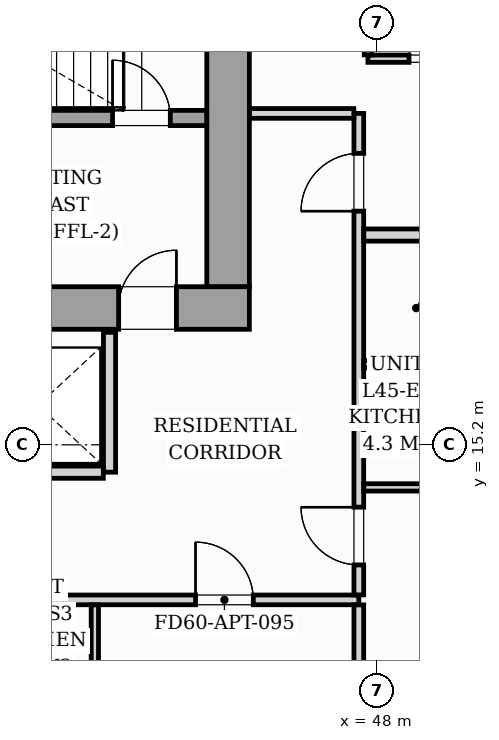
"""IFC4 building model, lengths in metres.
Left out: names, types, materials, properties, quantities, classifications, styles, units other than length and angle.
Written with IfcOpenShell. Run it as: python <this file> out.ifc"""

import sys

from ifc_helpers import new_model, si_unit, direction, frame, frame_2d, origin, origin_2d, place, context, subcontext, project, spatial, rectangle, i_section, extrude, source, transform, mapped, element, fill, save


model = new_model("IFC4")
c1 = context("Model", 3, precision=1e-05, world=origin(), true_north=direction((0.0, 1.0)))
c2 = subcontext(c1, "Body", "Model", "MODEL_VIEW")
j1 = project(units=[si_unit("LENGTHUNIT", "METRE"), si_unit("PLANEANGLEUNIT", "RADIAN")], contexts=[c1])
p1 = place(None, origin())
s1 = spatial("IfcSite", under=j1, at=p1, CompositionType="ELEMENT")
p2 = place(p1, origin())
s2 = spatial("IfcBuilding", under=s1, at=p2, CompositionType="ELEMENT")
p3 = place(p2, frame((0.0, 0.0, 156.6)))
s3 = spatial("IfcBuildingStorey", under=s2, at=p3, CompositionType="ELEMENT", Elevation=156.6)
m1 = source(origin(), c2, "Body", "SweptSolid", [
    extrude(i_section(OverallWidth=0.421, OverallDepth=0.465, WebThickness=0.045, FlangeThickness=0.073, FilletRadius=0.018, at=origin_2d()), origin(), (0.0, 0.0, 1.0), 3.196),
])
p4 = place(p3, frame((45.6, 17.4, 0.002), z_axis=(0.0, 0.0, 1.0), x_axis=(1.0, 0.0, 0.0)))
e1 = element("IfcColumn", 1, at=p4, inside=s3, PredefinedType="PILASTER", context=c2, shape_type="MappedRepresentation", body=[
    mapped(m1, transform((0.0, 0.0, 0.0), scale=1.0)),
])
p5 = place(p3, frame((26.1, 17.45, 0.0), z_axis=(0.0, 0.0, 1.0), x_axis=(1.0, 0.0, 0.0)))
e2 = element("IfcWall", 2, at=p5, inside=s3, PredefinedType="SHEAR", context=c2, shape_type="SweptSolid", body=[
    extrude(rectangle(XDim=19.8, YDim=0.7, at=frame_2d((9.9, 0.0))), origin(), (0.0, 0.0, 1.0), 3.2),
])
p6 = place(p5, frame((1.05, 0.0, 0.0)))
e3 = element("IfcOpeningElement", 3, at=p6, cuts=e2, PredefinedType="OPENING", context=c2, shape_type="SweptSolid", body=[
    extrude(rectangle(XDim=0.95, YDim=2.06, at=frame_2d((0.475, 1.03))), frame((0.0, 0.36, 0.0), z_axis=(0.0, -1.0, 0.0), x_axis=(1.0, 0.0, 0.0)), (0.0, 0.0, 1.0), 0.72),
])
p7 = place(p5, frame((9.48, 0.0, 0.0)))
e4 = element("IfcOpeningElement", 4, at=p7, cuts=e2, PredefinedType="OPENING", context=c2, shape_type="SweptSolid", body=[
    extrude(rectangle(XDim=0.85, YDim=2.0, at=frame_2d((0.425, 1.0))), frame((0.0, 0.36, 0.0), z_axis=(0.0, -1.0, 0.0), x_axis=(1.0, 0.0, 0.0)), (0.0, 0.0, 1.0), 0.72),
])
p8 = place(p5, frame((17.65, 0.0, 0.0)))
e5 = element("IfcOpeningElement", 5, at=p8, cuts=e2, PredefinedType="OPENING", context=c2, shape_type="SweptSolid", body=[
    extrude(rectangle(XDim=0.95, YDim=2.06, at=frame_2d((0.475, 1.03))), frame((0.0, 0.36, 0.0), z_axis=(0.0, -1.0, 0.0), x_axis=(1.0, 0.0, 0.0)), (0.0, 0.0, 1.0), 0.72),
])
p9 = place(p3, frame((45.55, 17.802, 0.0), z_axis=(0.0, 0.0, 1.0), x_axis=(0.0, 1.0, 0.0)))
e6 = element("IfcWall", 6, at=p9, inside=s3, PredefinedType="SHEAR", context=c2, shape_type="SweptSolid", body=[
    extrude(rectangle(XDim=5.796, YDim=0.7, at=frame_2d((2.898, 0.0))), origin(), (0.0, 0.0, 1.0), 3.2),
])
p10 = place(p3, frame((37.05, 20.575, 0.0), z_axis=(0.0, 0.0, 1.0), x_axis=(1.0, 0.0, 0.0)))
e7 = element("IfcWall", 7, at=p10, inside=s3, PredefinedType="SOLIDWALL", context=c2, shape_type="SweptSolid", body=[
    extrude(rectangle(XDim=8.148, YDim=0.25, at=frame_2d((4.074, 0.0))), origin(), (0.0, 0.0, 1.0), 3.2),
])
p11 = place(p10, frame((6.6, 0.0, 0.0)))
e8 = element("IfcOpeningElement", 8, at=p11, cuts=e7, PredefinedType="OPENING", context=c2, shape_type="SweptSolid", body=[
    extrude(rectangle(XDim=0.95, YDim=2.06, at=frame_2d((0.475, 1.03))), frame((0.0, 0.135, 0.0), z_axis=(0.0, -1.0, 0.0), x_axis=(1.0, 0.0, 0.0)), (0.0, 0.0, 1.0), 0.27),
])
p12 = place(p3, frame((43.6, 14.75, 0.0), z_axis=(0.0, 0.0, 1.0), x_axis=(0.0, 1.0, 0.0)))
e9 = element("IfcWall", 9, at=p12, inside=s3, PredefinedType="PARTITIONING", context=c2, shape_type="SweptSolid", body=[
    extrude(rectangle(XDim=2.3, YDim=0.2, at=frame_2d((1.15, 0.0))), origin(), (0.0, 0.0, 1.0), 2.94),
])
p13 = place(p3, frame((41.352, 14.75, 0.0), z_axis=(0.0, 0.0, 1.0), x_axis=(1.0, 0.0, 0.0)))
e10 = element("IfcWall", 10, at=p13, inside=s3, PredefinedType="PARTITIONING", context=c2, shape_type="SweptSolid", body=[
    extrude(rectangle(XDim=2.146, YDim=0.2, at=frame_2d((1.073, 0.0))), origin(), (0.0, 0.0, 1.0), 2.94),
])
p14 = place(p3, frame((22.05, 12.65, 0.0), z_axis=(0.0, 0.0, 1.0), x_axis=(1.0, 0.0, 0.0)))
e11 = element("IfcWall", 11, at=p14, inside=s3, PredefinedType="PARTITIONING", context=c2, shape_type="SweptSolid", body=[
    extrude(rectangle(XDim=25.65, YDim=0.16, at=frame_2d((12.825, 0.0))), origin(), (0.0, 0.0, 1.0), 2.94),
])
p15 = place(p14, frame((1.736, 0.0, 0.0)))
e12 = element("IfcOpeningElement", 12, at=p15, cuts=e11, PredefinedType="OPENING", context=c2, shape_type="SweptSolid", body=[
    extrude(rectangle(XDim=0.95, YDim=2.06, at=frame_2d((0.475, 1.03))), frame((0.0, 0.09, 0.0), z_axis=(0.0, -1.0, 0.0), x_axis=(1.0, 0.0, 0.0)), (0.0, 0.0, 1.0), 0.18),
])
p16 = place(p14, frame((10.3, 0.0, 0.0)))
e13 = element("IfcOpeningElement", 13, at=p16, cuts=e11, PredefinedType="OPENING", context=c2, shape_type="SweptSolid", body=[
    extrude(rectangle(XDim=0.95, YDim=2.06, at=frame_2d((0.475, 1.03))), frame((0.0, 0.09, 0.0), z_axis=(0.0, -1.0, 0.0), x_axis=(1.0, 0.0, 0.0)), (0.0, 0.0, 1.0), 0.18),
])
p17 = place(p14, frame((22.965, 0.0, 0.0)))
e14 = element("IfcOpeningElement", 14, at=p17, cuts=e11, PredefinedType="OPENING", context=c2, shape_type="SweptSolid", body=[
    extrude(rectangle(XDim=0.95, YDim=2.06, at=frame_2d((0.475, 1.03))), frame((0.0, 0.09, 0.0), z_axis=(0.0, -1.0, 0.0), x_axis=(1.0, 0.0, 0.0)), (0.0, 0.0, 1.0), 0.18),
])
p18 = place(p3, frame((47.7, 5.783, 0.0), z_axis=(0.0, 0.0, 1.0), x_axis=(0.0, 1.0, 0.0)))
e15 = element("IfcWall", 15, at=p18, inside=s3, PredefinedType="PARTITIONING", context=c2, shape_type="SweptSolid", body=[
    extrude(rectangle(XDim=6.785, YDim=0.16, at=frame_2d((3.393, 0.0))), origin(), (0.0, 0.0, 1.0), 2.94),
])
p19 = place(p3, frame((47.7, 12.732, 0.0), z_axis=(0.0, 0.0, 1.0), x_axis=(0.0, 1.0, 0.0)))
e16 = element("IfcWall", 16, at=p19, inside=s3, PredefinedType="PARTITIONING", context=c2, shape_type="SweptSolid", body=[
    extrude(rectangle(XDim=7.918, YDim=0.16, at=frame_2d((3.959, 0.0))), origin(), (0.0, 0.0, 1.0), 2.94),
])
p20 = place(p19, frame((0.493, 0.0, 0.0)))
e17 = element("IfcOpeningElement", 17, at=p20, cuts=e16, PredefinedType="OPENING", context=c2, shape_type="SweptSolid", body=[
    extrude(rectangle(XDim=0.95, YDim=2.06, at=frame_2d((0.475, 1.03))), frame((0.0, 0.09, 0.0), z_axis=(0.0, -1.0, 0.0), x_axis=(1.0, 0.0, 0.0)), (0.0, 0.0, 1.0), 0.18),
])
p21 = place(p19, frame((6.311, 0.0, 0.0)))
e18 = element("IfcOpeningElement", 18, at=p21, cuts=e16, PredefinedType="OPENING", context=c2, shape_type="SweptSolid", body=[
    extrude(rectangle(XDim=0.95, YDim=2.06, at=frame_2d((0.475, 1.03))), frame((0.0, 0.09, 0.0), z_axis=(0.0, -1.0, 0.0), x_axis=(1.0, 0.0, 0.0)), (0.0, 0.0, 1.0), 0.18),
])
p22 = place(p3, frame((45.902, 20.65, 0.0), z_axis=(0.0, 0.0, 1.0), x_axis=(1.0, 0.0, 0.0)))
e19 = element("IfcWall", 19, at=p22, inside=s3, PredefinedType="PARTITIONING", context=c2, shape_type="SweptSolid", body=[
    extrude(rectangle(XDim=1.716, YDim=0.16, at=frame_2d((0.858, 0.0))), origin(), (0.0, 0.0, 1.0), 2.94),
])
p23 = place(p3, frame((43.359, 10.462, 0.0), z_axis=(0.0, 0.0, 1.0), x_axis=(0.0, 1.0, 0.0)))
e20 = element("IfcWall", 20, at=p23, inside=s3, PredefinedType="PARTITIONING", context=c2, shape_type="SweptSolid", body=[
    extrude(rectangle(XDim=2.106, YDim=0.12, at=frame_2d((1.053, 0.0))), origin(), (0.0, 0.0, 1.0), 2.94),
])
p24 = place(p3, frame((47.782, 18.65, 0.0), z_axis=(0.0, 0.0, 1.0), x_axis=(1.0, 0.0, 0.0)))
e21 = element("IfcWall", 21, at=p24, inside=s3, PredefinedType="PARTITIONING", context=c2, shape_type="SweptSolid", body=[
    extrude(rectangle(XDim=12.04, YDim=0.2, at=frame_2d((6.02, 0.0))), origin(), (0.0, 0.0, 1.0), 2.94),
])
p25 = place(p3, frame((47.782, 16.525, 0.0), z_axis=(0.0, 0.0, 1.0), x_axis=(1.0, 0.0, 0.0)))
e22 = element("IfcWall", 22, at=p25, inside=s3, PredefinedType="PARTITIONING", context=c2, shape_type="SweptSolid", body=[
    extrude(rectangle(XDim=2.256, YDim=0.12, at=frame_2d((1.128, 0.0))), origin(), (0.0, 0.0, 1.0), 2.063),
])
p26 = place(p3, frame((47.782, 14.5, 0.0), z_axis=(0.0, 0.0, 1.0), x_axis=(1.0, 0.0, 0.0)))
e23 = element("IfcWall", 23, at=p26, inside=s3, PredefinedType="PARTITIONING", context=c2, shape_type="SweptSolid", body=[
    extrude(rectangle(XDim=2.256, YDim=0.12, at=frame_2d((1.128, 0.0))), origin(), (0.0, 0.0, 1.0), 2.94),
])
p27 = place(p3, frame((47.85, 21.55, 0.0), z_axis=(0.0, 0.0, 1.0), x_axis=(1.0, 0.0, 0.0)))
e24 = element("IfcWall", 24, at=p27, inside=s3, PredefinedType="PARTITIONING", context=c2, shape_type="SweptSolid", body=[
    extrude(rectangle(XDim=4.2, YDim=0.12, at=frame_2d((2.1, 0.0))), origin(), (0.0, 0.0, 1.0), 2.94),
])
p28 = place(p27, frame((0.675, 0.0, 0.0)))
e25 = element("IfcOpeningElement", 25, at=p28, cuts=e24, PredefinedType="OPENING", context=c2, shape_type="SweptSolid", body=[
    extrude(rectangle(XDim=0.85, YDim=2.05, at=frame_2d((0.425, 1.025))), frame((0.0, 0.07, 0.0), z_axis=(0.0, -1.0, 0.0), x_axis=(1.0, 0.0, 0.0)), (0.0, 0.0, 1.0), 0.14),
])
p29 = place(p27, frame((2.8, 0.0, 0.0)))
e26 = element("IfcOpeningElement", 26, at=p29, cuts=e24, PredefinedType="OPENING", context=c2, shape_type="SweptSolid", body=[
    extrude(rectangle(XDim=0.8, YDim=2.02, at=frame_2d((0.4, 1.01))), frame((0.0, 0.07, 0.0), z_axis=(0.0, -1.0, 0.0), x_axis=(1.0, 0.0, 0.0)), (0.0, 0.0, 1.0), 0.14),
])
p30 = place(p3, frame((47.85, 21.612, 0.0), z_axis=(0.0, 0.0, 1.0), x_axis=(0.0, 1.0, 0.0)))
e27 = element("IfcWall", 27, at=p30, inside=s3, PredefinedType="PARTITIONING", context=c2, shape_type="SweptSolid", body=[
    extrude(rectangle(XDim=2.126, YDim=0.12, at=frame_2d((1.063, 0.0))), origin(), (0.0, 0.0, 1.0), 2.94),
])
m2 = source(origin(), c2, "Body", "SweptSolid", [
    extrude(rectangle(XDim=0.95, YDim=2.06, at=frame_2d((0.475, 1.03))), frame((0.0, 0.025, 0.0), z_axis=(0.0, -1.0, 0.0), x_axis=(1.0, 0.0, 0.0)), (0.0, 0.0, 1.0), 0.05),
])
p31 = place(p8, origin())
e28 = element("IfcDoor", 28, at=p31, inside=s3, OperationType="SINGLE_SWING_RIGHT", PredefinedType="DOOR", context=c2, shape_type="MappedRepresentation", body=[
    mapped(m2, transform((0.0, 0.0, 0.0), scale=1.0)),
])
fill(e5, e28)
p32 = place(p11, origin())
e29 = element("IfcDoor", 29, at=p32, inside=s3, OperationType="SINGLE_SWING_LEFT", PredefinedType="DOOR", context=c2, shape_type="MappedRepresentation", body=[
    mapped(m2, transform((0.0, 0.0, 0.0), scale=1.0)),
])
fill(e8, e29)
m3 = source(origin(), c2, "Body", "SweptSolid", [
    extrude(rectangle(XDim=0.95, YDim=2.06, at=frame_2d((0.475, 1.03))), frame((0.0, 0.025, 0.0), z_axis=(0.0, -1.0, 0.0), x_axis=(1.0, 0.0, 0.0)), (0.0, 0.0, 1.0), 0.05),
])
p33 = place(p17, origin())
e30 = element("IfcDoor", 30, at=p33, inside=s3, OperationType="SINGLE_SWING_LEFT", PredefinedType="DOOR", context=c2, shape_type="MappedRepresentation", body=[
    mapped(m3, transform((0.0, 0.0, 0.0), scale=1.0)),
])
fill(e14, e30)
p34 = place(p20, origin())
e31 = element("IfcDoor", 31, at=p34, inside=s3, OperationType="SINGLE_SWING_RIGHT", PredefinedType="DOOR", context=c2, shape_type="MappedRepresentation", body=[
    mapped(m3, transform((0.0, 0.0, 0.0), scale=1.0)),
])
fill(e17, e31)
p35 = place(p21, origin())
e32 = element("IfcDoor", 32, at=p35, inside=s3, OperationType="SINGLE_SWING_LEFT", PredefinedType="DOOR", context=c2, shape_type="MappedRepresentation", body=[
    mapped(m3, transform((0.0, 0.0, 0.0), scale=1.0)),
])
fill(e18, e32)
m4 = source(origin(), c2, "Body", "SweptSolid", [
    extrude(rectangle(XDim=0.85, YDim=2.05, at=frame_2d((0.425, 1.025))), frame((0.0, 0.025, 0.0), z_axis=(0.0, -1.0, 0.0), x_axis=(1.0, 0.0, 0.0)), (0.0, 0.0, 1.0), 0.05),
])
p36 = place(p28, origin())
e33 = element("IfcDoor", 33, at=p36, inside=s3, OperationType="SINGLE_SWING_RIGHT", PredefinedType="DOOR", context=c2, shape_type="MappedRepresentation", body=[
    mapped(m4, transform((0.0, 0.0, 0.0), scale=1.0)),
])
fill(e25, e33)
save(model, sys.argv[1])
